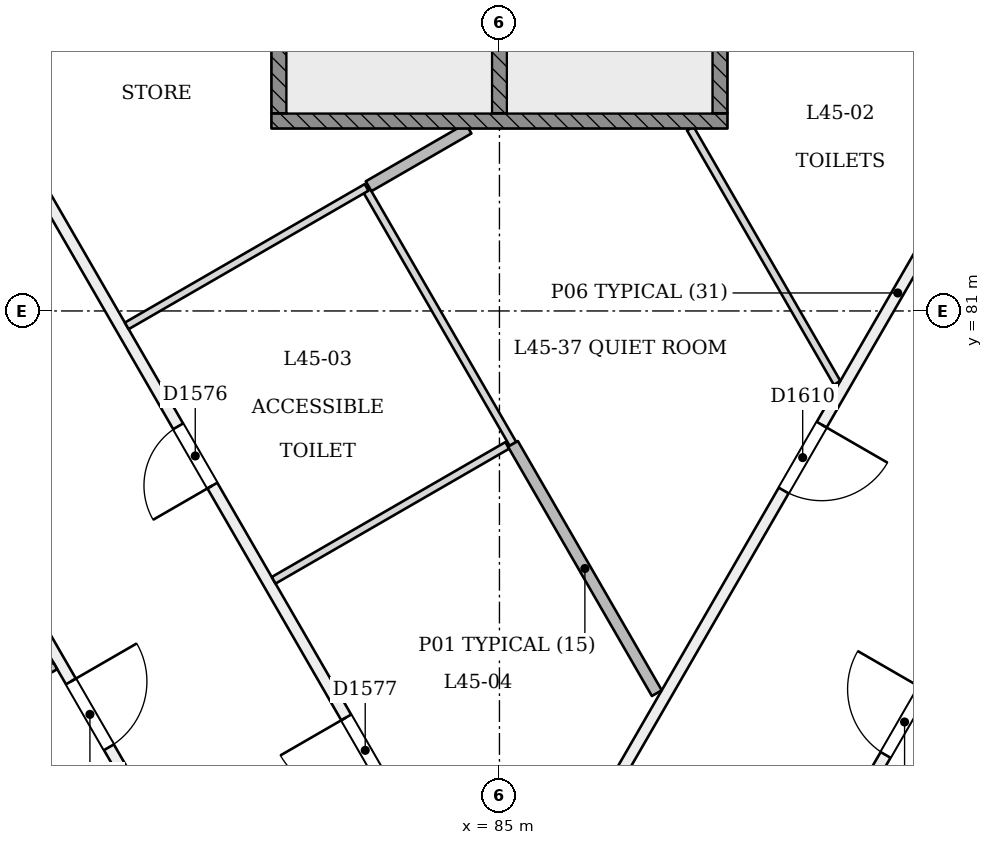
"""IFC4 building model, lengths in metres.
Left out: names, types, materials, properties, quantities, classifications, styles, units other than length and angle.
Written with IfcOpenShell. Run it as: python <this file> out.ifc"""

import sys

from ifc_helpers import new_model, si_unit, direction, frame, frame_2d, origin, place, context, subcontext, project, spatial, rectangle, extrude, element, fill, save


model = new_model("IFC4")
c1 = context("Model", 3, precision=1e-05, world=origin(), true_north=direction((0.0, 1.0)))
c2 = subcontext(c1, "Body", "Model", "MODEL_VIEW")
j1 = project(units=[si_unit("LENGTHUNIT", "METRE"), si_unit("PLANEANGLEUNIT", "RADIAN")], contexts=[c1])
p1 = place(None, origin())
s1 = spatial("IfcSite", under=j1, at=p1, CompositionType="ELEMENT")
p2 = place(p1, origin())
s2 = spatial("IfcBuilding", under=s1, at=p2, CompositionType="ELEMENT")
p3 = place(p2, frame((0.0, 0.0, 174.6)))
s3 = spatial("IfcBuildingStorey", under=s2, at=p3, CompositionType="ELEMENT", Elevation=174.6)
p4 = place(p3, frame((95.415, 90.2, 0.0), z_axis=(0.0, 0.0, 1.0), x_axis=(-0.500002869824, -0.866023746885, 0.0)))
e1 = element("IfcWall", 1, at=p4, inside=s3, PredefinedType="PARTITIONING", context=c2, shape_type="SweptSolid", body=[
    extrude(rectangle(XDim=20.7, YDim=0.15, at=frame_2d((10.35, 0.0))), origin(), (0.0, 0.0, 1.0), 3.15),
])
p5 = place(p4, frame((8.391, 0.0, 0.0)))
e2 = element("IfcOpeningElement", 2, at=p5, cuts=e1, PredefinedType="OPENING", context=c2, shape_type="SweptSolid", body=[
    extrude(rectangle(XDim=0.9, YDim=2.1, at=frame_2d((0.45, 1.05))), frame((0.0, 0.085, 0.0), z_axis=(0.0, -1.0, 0.0), x_axis=(1.0, 0.0, 0.0)), (0.0, 0.0, 1.0), 0.171),
])
p6 = place(p4, frame((3.637, 0.0, 0.0)))
e3 = element("IfcOpeningElement", 3, at=p6, cuts=e1, PredefinedType="OPENING", context=c2, shape_type="SweptSolid", body=[
    extrude(rectangle(XDim=1.0, YDim=2.1, at=frame_2d((0.5, 1.05))), frame((0.0, 0.085, 0.0), z_axis=(0.0, -1.0, 0.0), x_axis=(1.0, 0.0, 0.0)), (0.0, 0.0, 1.0), 0.171),
])
p7 = place(p4, frame((12.351, 0.0, 0.0)))
e4 = element("IfcOpeningElement", 4, at=p7, cuts=e1, PredefinedType="OPENING", context=c2, shape_type="SweptSolid", body=[
    extrude(rectangle(XDim=1.0, YDim=2.1, at=frame_2d((0.5, 1.05))), frame((0.0, 0.085, 0.0), z_axis=(0.0, -1.0, 0.0), x_axis=(1.0, 0.0, 0.0)), (0.0, 0.0, 1.0), 0.171),
])
p8 = place(p3, frame((71.222, 90.225, 0.0), z_axis=(0.0, 0.0, 1.0), x_axis=(0.500002130291, -0.866024173857, 0.0)))
e5 = element("IfcWall", 5, at=p8, inside=s3, PredefinedType="PARTITIONING", context=c2, shape_type="SweptSolid", body=[
    extrude(rectangle(XDim=27.556, YDim=0.15, at=frame_2d((13.778, 0.0))), origin(), (0.0, 0.0, 1.0), 2.75),
])
p9 = place(p8, frame((0.72, 0.0, 0.0)))
e6 = element("IfcOpeningElement", 6, at=p9, cuts=e5, PredefinedType="OPENING", context=c2, shape_type="SweptSolid", body=[
    extrude(rectangle(XDim=1.0, YDim=2.1, at=frame_2d((0.5, 1.05))), frame((0.0, 0.085, 0.0), z_axis=(0.0, -1.0, 0.0), x_axis=(1.0, 0.0, 0.0)), (0.0, 0.0, 1.0), 0.171),
])
p10 = place(p8, frame((7.395, 0.0, 0.0)))
e7 = element("IfcOpeningElement", 7, at=p10, cuts=e5, PredefinedType="OPENING", context=c2, shape_type="SweptSolid", body=[
    extrude(rectangle(XDim=1.0, YDim=2.1, at=frame_2d((0.5, 1.05))), frame((0.0, 0.085, 0.0), z_axis=(0.0, -1.0, 0.0), x_axis=(1.0, 0.0, 0.0)), (0.0, 0.0, 1.0), 0.171),
])
p11 = place(p8, frame((9.72, 0.0, 0.0)))
e8 = element("IfcOpeningElement", 8, at=p11, cuts=e5, PredefinedType="OPENING", context=c2, shape_type="SweptSolid", body=[
    extrude(rectangle(XDim=1.0, YDim=2.1, at=frame_2d((0.5, 1.05))), frame((0.0, 0.085, 0.0), z_axis=(0.0, -1.0, 0.0), x_axis=(1.0, 0.0, 0.0)), (0.0, 0.0, 1.0), 0.171),
])
p12 = place(p8, frame((16.28, 0.0, 0.0)))
e9 = element("IfcOpeningElement", 9, at=p12, cuts=e5, PredefinedType="OPENING", context=c2, shape_type="SweptSolid", body=[
    extrude(rectangle(XDim=1.0, YDim=2.1, at=frame_2d((0.5, 1.05))), frame((0.0, 0.085, 0.0), z_axis=(0.0, -1.0, 0.0), x_axis=(1.0, 0.0, 0.0)), (0.0, 0.0, 1.0), 0.171),
])
p13 = place(p8, frame((18.72, 0.0, 0.0)))
e10 = element("IfcOpeningElement", 10, at=p13, cuts=e5, PredefinedType="OPENING", context=c2, shape_type="SweptSolid", body=[
    extrude(rectangle(XDim=1.0, YDim=2.1, at=frame_2d((0.5, 1.05))), frame((0.0, 0.085, 0.0), z_axis=(0.0, -1.0, 0.0), x_axis=(1.0, 0.0, 0.0)), (0.0, 0.0, 1.0), 0.171),
])
p14 = place(p8, frame((25.697, 0.0, 0.0)))
e11 = element("IfcOpeningElement", 11, at=p14, cuts=e5, PredefinedType="OPENING", context=c2, shape_type="SweptSolid", body=[
    extrude(rectangle(XDim=1.2, YDim=2.1, at=frame_2d((0.6, 1.05))), frame((0.0, 0.085, 0.0), z_axis=(0.0, -1.0, 0.0), x_axis=(1.0, 0.0, 0.0)), (0.0, 0.0, 1.0), 0.171),
])
p15 = place(p3, frame((85.065, 66.473, 0.0), z_axis=(0.0, 0.0, 1.0), x_axis=(0.500005289472, 0.866022349885, 0.0)))
e12 = element("IfcWall", 12, at=p15, inside=s3, PredefinedType="PARTITIONING", context=c2, shape_type="SweptSolid", body=[
    extrude(rectangle(XDim=27.397, YDim=0.15, at=frame_2d((13.699, 0.0))), origin(), (0.0, 0.0, 1.0), 2.75),
])
p16 = place(p15, frame((1.03, 0.0, 0.0)))
e13 = element("IfcOpeningElement", 13, at=p16, cuts=e12, PredefinedType="OPENING", context=c2, shape_type="SweptSolid", body=[
    extrude(rectangle(XDim=1.0, YDim=2.1, at=frame_2d((0.5, 1.05))), frame((0.0, 0.085, 0.0), z_axis=(0.0, -1.0, 0.0), x_axis=(1.0, 0.0, 0.0)), (0.0, 0.0, 1.0), 0.171),
])
p17 = place(p15, frame((7.821, 0.0, 0.0)))
e14 = element("IfcOpeningElement", 14, at=p17, cuts=e12, PredefinedType="OPENING", context=c2, shape_type="SweptSolid", body=[
    extrude(rectangle(XDim=1.0, YDim=2.1, at=frame_2d((0.5, 1.05))), frame((0.0, 0.085, 0.0), z_axis=(0.0, -1.0, 0.0), x_axis=(1.0, 0.0, 0.0)), (0.0, 0.0, 1.0), 0.171),
])
p18 = place(p15, frame((10.03, 0.0, 0.0)))
e15 = element("IfcOpeningElement", 15, at=p18, cuts=e12, PredefinedType="OPENING", context=c2, shape_type="SweptSolid", body=[
    extrude(rectangle(XDim=1.0, YDim=2.1, at=frame_2d((0.5, 1.05))), frame((0.0, 0.085, 0.0), z_axis=(0.0, -1.0, 0.0), x_axis=(1.0, 0.0, 0.0)), (0.0, 0.0, 1.0), 0.171),
])
p19 = place(p15, frame((16.821, 0.0, 0.0)))
e16 = element("IfcOpeningElement", 16, at=p19, cuts=e12, PredefinedType="OPENING", context=c2, shape_type="SweptSolid", body=[
    extrude(rectangle(XDim=1.0, YDim=2.1, at=frame_2d((0.5, 1.05))), frame((0.0, 0.085, 0.0), z_axis=(0.0, -1.0, 0.0), x_axis=(1.0, 0.0, 0.0)), (0.0, 0.0, 1.0), 0.171),
])
p20 = place(p15, frame((19.03, 0.0, 0.0)))
e17 = element("IfcOpeningElement", 17, at=p20, cuts=e12, PredefinedType="OPENING", context=c2, shape_type="SweptSolid", body=[
    extrude(rectangle(XDim=1.0, YDim=2.1, at=frame_2d((0.5, 1.05))), frame((0.0, 0.085, 0.0), z_axis=(0.0, -1.0, 0.0), x_axis=(1.0, 0.0, 0.0)), (0.0, 0.0, 1.0), 0.171),
])
p21 = place(p15, frame((25.912, 0.0, 0.0)))
e18 = element("IfcOpeningElement", 18, at=p21, cuts=e12, PredefinedType="OPENING", context=c2, shape_type="SweptSolid", body=[
    extrude(rectangle(XDim=1.2, YDim=2.1, at=frame_2d((0.6, 1.05))), frame((0.0, 0.085, 0.0), z_axis=(0.0, -1.0, 0.0), x_axis=(1.0, 0.0, 0.0)), (0.0, 0.0, 1.0), 0.171),
])
p22 = place(p3, frame((85.0, 72.161, 0.0), z_axis=(0.0, 0.0, 1.0), x_axis=(-0.500006534091, 0.866021631292, 0.0)))
e19 = element("IfcWall", 19, at=p22, inside=s3, PredefinedType="PARTITIONING", context=c2, shape_type="SweptSolid", body=[
    extrude(rectangle(XDim=20.83, YDim=0.15, at=frame_2d((10.415, 0.0))), origin(), (0.0, 0.0, 1.0), 3.15),
])
p23 = place(p22, frame((7.554, 0.0, 0.0)))
e20 = element("IfcOpeningElement", 20, at=p23, cuts=e19, PredefinedType="OPENING", context=c2, shape_type="SweptSolid", body=[
    extrude(rectangle(XDim=0.9, YDim=2.1, at=frame_2d((0.45, 1.05))), frame((0.0, 0.085, 0.0), z_axis=(0.0, -1.0, 0.0), x_axis=(1.0, 0.0, 0.0)), (0.0, 0.0, 1.0), 0.171),
])
p24 = place(p22, frame((3.032, 0.0, 0.0)))
e21 = element("IfcOpeningElement", 21, at=p24, cuts=e19, PredefinedType="OPENING", context=c2, shape_type="SweptSolid", body=[
    extrude(rectangle(XDim=1.0, YDim=2.1, at=frame_2d((0.5, 1.05))), frame((0.0, 0.085, 0.0), z_axis=(0.0, -1.0, 0.0), x_axis=(1.0, 0.0, 0.0)), (0.0, 0.0, 1.0), 0.171),
])
p25 = place(p22, frame((16.878, 0.0, 0.0)))
e22 = element("IfcOpeningElement", 22, at=p25, cuts=e19, PredefinedType="OPENING", context=c2, shape_type="SweptSolid", body=[
    extrude(rectangle(XDim=1.0, YDim=2.1, at=frame_2d((0.5, 1.05))), frame((0.0, 0.085, 0.0), z_axis=(0.0, -1.0, 0.0), x_axis=(1.0, 0.0, 0.0)), (0.0, 0.0, 1.0), 0.171),
])
p26 = place(p22, frame((12.286, 0.0, 0.0)))
e23 = element("IfcOpeningElement", 23, at=p26, cuts=e19, PredefinedType="OPENING", context=c2, shape_type="SweptSolid", body=[
    extrude(rectangle(XDim=1.0, YDim=2.1, at=frame_2d((0.5, 1.05))), frame((0.0, 0.085, 0.0), z_axis=(0.0, -1.0, 0.0), x_axis=(1.0, 0.0, 0.0)), (0.0, 0.0, 1.0), 0.171),
])
p27 = place(p3, frame((91.864, 84.199, 0.0), z_axis=(0.0, 0.0, 1.0), x_axis=(-0.866018833748, 0.500011379465, 0.0)))
e24 = element("IfcWall", 24, at=p27, inside=s3, PredefinedType="PARTITIONING", context=c2, shape_type="SweptSolid", body=[
    extrude(rectangle(XDim=4.462, YDim=0.1, at=frame_2d((2.231, 0.0))), origin(), (0.0, 0.0, 1.0), 3.15),
])
p28 = place(p3, frame((87.51, 83.4, 0.0), z_axis=(0.0, 0.0, 1.0), x_axis=(0.499979582667, -0.866037191416, 0.0)))
e25 = element("IfcWall", 25, at=p28, inside=s3, PredefinedType="PARTITIONING", context=c2, shape_type="SweptSolid", body=[
    extrude(rectangle(XDim=3.863, YDim=0.1, at=frame_2d((1.932, 0.0))), origin(), (0.0, 0.0, 1.0), 3.15),
])
p29 = place(p3, frame((82.029, 77.457, 0.0), z_axis=(0.0, 0.0, 1.0), x_axis=(0.866033224232, 0.499986454343, 0.0)))
e26 = element("IfcWall", 26, at=p29, inside=s3, PredefinedType="PARTITIONING", context=c2, shape_type="SweptSolid", body=[
    extrude(rectangle(XDim=3.549, YDim=0.1, at=frame_2d((1.774, 0.0))), origin(), (0.0, 0.0, 1.0), 3.15),
])
p30 = place(p3, frame((85.177, 79.251, 0.0), z_axis=(0.0, 0.0, 1.0), x_axis=(-0.500025259026, 0.866010819988, 0.0)))
e27 = element("IfcWall", 27, at=p30, inside=s3, PredefinedType="PARTITIONING", context=c2, shape_type="SweptSolid", body=[
    extrude(rectangle(XDim=3.885, YDim=0.1, at=frame_2d((1.942, 0.0))), origin(), (0.0, 0.0, 1.0), 3.15),
])
p31 = place(p3, frame((83.252, 82.625, 0.0), z_axis=(0.0, 0.0, 1.0), x_axis=(-0.866032721818, -0.499987324581, 0.0)))
e28 = element("IfcWall", 28, at=p31, inside=s3, PredefinedType="PARTITIONING", context=c2, shape_type="SweptSolid", body=[
    extrude(rectangle(XDim=3.644, YDim=0.1, at=frame_2d((1.822, 0.0))), origin(), (0.0, 0.0, 1.0), 3.15),
])
p32 = place(p3, frame((87.071, 75.972, 0.0), z_axis=(0.0, 0.0, 1.0), x_axis=(-0.50000898992, 0.86602021339, 0.0)))
e29 = element("IfcWall", 29, at=p32, inside=s3, PredefinedType="PARTITIONING", context=c2, shape_type="SweptSolid", body=[
    extrude(rectangle(XDim=3.786, YDim=0.15, at=frame_2d((1.893, 0.0))), origin(), (0.0, 0.0, 1.0), 3.15),
])
p33 = place(p3, frame((79.157, 76.331, 0.0), z_axis=(0.0, 0.0, 1.0), x_axis=(-0.866011447264, -0.500024172624, 0.0)))
e30 = element("IfcWall", 30, at=p33, inside=s3, PredefinedType="PARTITIONING", context=c2, shape_type="SweptSolid", body=[
    extrude(rectangle(XDim=2.825, YDim=0.1, at=frame_2d((1.413, 0.0))), origin(), (0.0, 0.0, 1.0), 3.15),
])
p34 = place(p3, frame((84.594, 83.4, 0.0), z_axis=(0.0, 0.0, 1.0), x_axis=(-0.866038344573, -0.499977585228, 0.0)))
e31 = element("IfcWall", 31, at=p34, inside=s3, PredefinedType="PARTITIONING", context=c2, shape_type="SweptSolid", body=[
    extrude(rectangle(XDim=1.519, YDim=0.15, at=frame_2d((0.759, 0.0))), origin(), (0.0, 0.0, 1.0), 3.15),
])
p35 = place(p3, frame((82.0, 83.5, 0.0), z_axis=(0.0, 0.0, 1.0), x_axis=(1.0, 0.0, 0.0)))
e32 = element("IfcWall", 32, at=p35, inside=s3, PredefinedType="SOLIDWALL", context=c2, shape_type="SweptSolid", body=[
    extrude(rectangle(XDim=6.0, YDim=0.2, at=frame_2d((3.0, 0.0))), origin(), (0.0, 0.0, 1.0), 3.15),
])
for number, where, z_axis, x_axis in (
    (33, (82.1, 83.6, 0.0), (0.0, 0.0, 1.0), (0.0, 1.0, 0.0)),
    (34, (87.9, 83.6, 0.0), (0.0, 0.0, 1.0), (0.0, 1.0, 0.0)),
    (35, (85.0, 83.6, 0.0), (0.0, 0.0, 1.0), (0.0, 1.0, 0.0)),
):
    element("IfcWall", number, at=place(p3, frame(where, z_axis=z_axis, x_axis=x_axis)), inside=s3, PredefinedType="SOLIDWALL", context=c2, shape_type="SweptSolid", body=[
        extrude(rectangle(XDim=6.8, YDim=0.2, at=frame_2d((3.4, 0.0))), origin(), (0.0, 0.0, 1.0), 3.15),
    ])
p36 = place(p23, origin())
e36 = element("IfcDoor", 36, at=p36, inside=s3, OperationType="SINGLE_SWING_LEFT", PredefinedType="NOTDEFINED", context=c2, shape_type="SweptSolid", body=[
    extrude(rectangle(XDim=0.9, YDim=2.1, at=frame_2d((0.45, 1.05))), frame((0.0, 0.025, 0.0), z_axis=(0.0, -1.0, 0.0), x_axis=(1.0, 0.0, 0.0)), (0.0, 0.0, 1.0), 0.05),
])
fill(e20, e36)
p37 = place(p24, origin())
e37 = element("IfcDoor", 37, at=p37, inside=s3, OperationType="SINGLE_SWING_RIGHT", PredefinedType="NOTDEFINED", context=c2, shape_type="SweptSolid", body=[
    extrude(rectangle(XDim=1.0, YDim=2.1, at=frame_2d((0.5, 1.05))), frame((0.0, 0.025, 0.0), z_axis=(0.0, -1.0, 0.0), x_axis=(1.0, 0.0, 0.0)), (0.0, 0.0, 1.0), 0.05),
])
fill(e21, e37)
p38 = place(p12, origin())
e38 = element("IfcDoor", 38, at=p38, inside=s3, OperationType="SINGLE_SWING_LEFT", PredefinedType="NOTDEFINED", context=c2, shape_type="SweptSolid", body=[
    extrude(rectangle(XDim=1.0, YDim=2.1, at=frame_2d((0.5, 1.05))), frame((0.0, 0.025, 0.0), z_axis=(0.0, -1.0, 0.0), x_axis=(1.0, 0.0, 0.0)), (0.0, 0.0, 1.0), 0.05),
])
fill(e9, e38)
p39 = place(p18, origin())
e39 = element("IfcDoor", 39, at=p39, inside=s3, OperationType="SINGLE_SWING_RIGHT", PredefinedType="NOTDEFINED", context=c2, shape_type="SweptSolid", body=[
    extrude(rectangle(XDim=1.0, YDim=2.1, at=frame_2d((0.5, 1.05))), frame((0.0, 0.025, 0.0), z_axis=(0.0, -1.0, 0.0), x_axis=(1.0, 0.0, 0.0)), (0.0, 0.0, 1.0), 0.05),
])
fill(e15, e39)
p40 = place(p7, origin())
e40 = element("IfcDoor", 40, at=p40, inside=s3, OperationType="SINGLE_SWING_LEFT", PredefinedType="NOTDEFINED", context=c2, shape_type="SweptSolid", body=[
    extrude(rectangle(XDim=1.0, YDim=2.1, at=frame_2d((0.5, 1.05))), frame((0.0, 0.025, 0.0), z_axis=(0.0, -1.0, 0.0), x_axis=(1.0, 0.0, 0.0)), (0.0, 0.0, 1.0), 0.05),
])
fill(e4, e40)
save(model, sys.argv[1])
